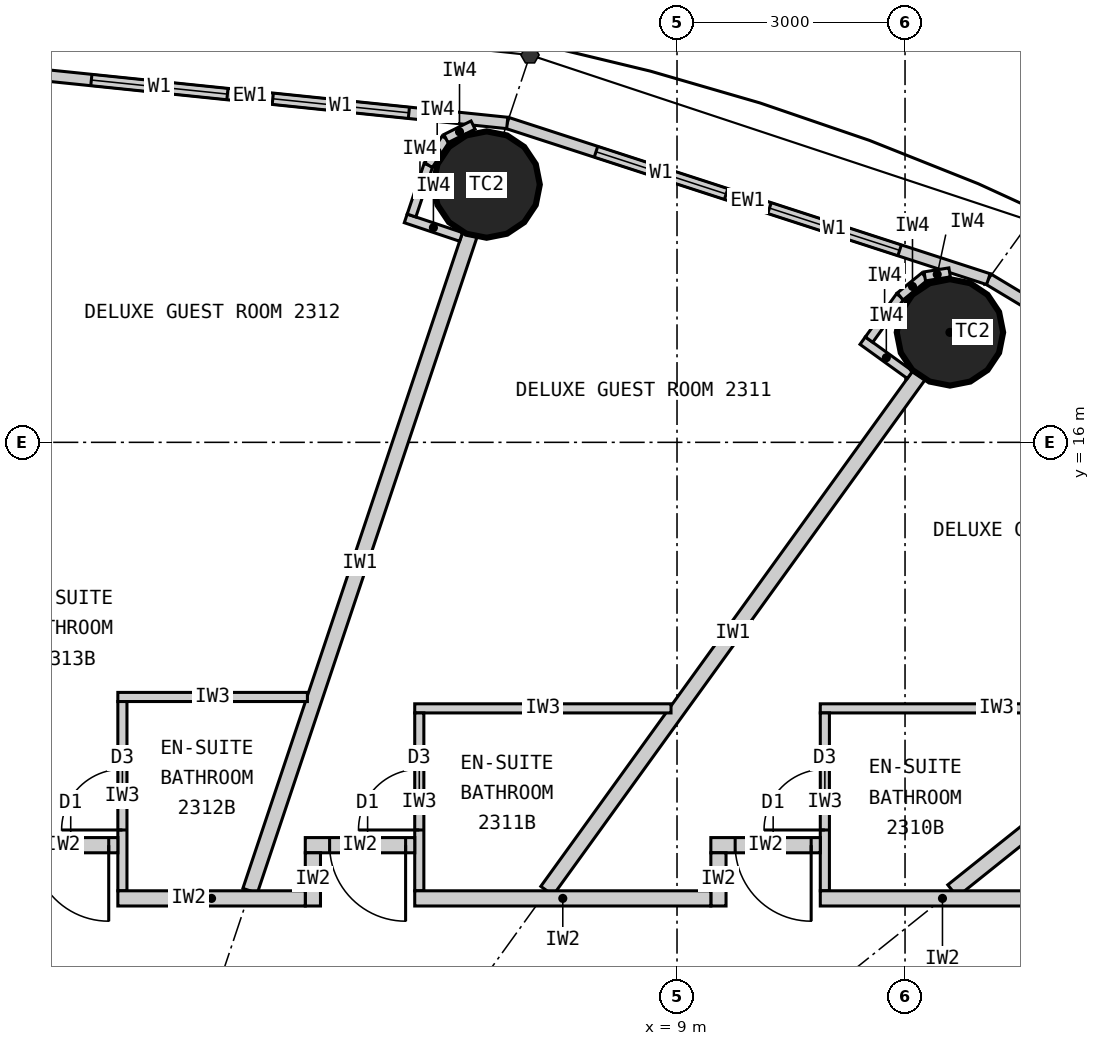
"""IFC4 building model, lengths in metres.
Left out: names, types, materials, properties, quantities, classifications, styles, units other than length and angle.
Written with IfcOpenShell. Run it as: python <this file> out.ifc"""

import sys

from ifc_helpers import new_model, si_unit, direction, frame, frame_2d, origin, origin_2d, place, context, subcontext, project, spatial, rectangle, circle, extrude, clip, halfspace, element, fill, save


model = new_model("IFC4")
c1 = context("Model", 3, precision=1e-05, world=origin(), true_north=direction((0.0, 1.0)))
c2 = subcontext(c1, "Body", "Model", "MODEL_VIEW")
j1 = project(units=[si_unit("LENGTHUNIT", "METRE"), si_unit("PLANEANGLEUNIT", "RADIAN")], contexts=[c1])
p1 = place(None, origin())
s1 = spatial("IfcSite", under=j1, at=p1, CompositionType="ELEMENT")
p2 = place(p1, origin())
s2 = spatial("IfcBuilding", under=s1, at=p2, CompositionType="ELEMENT")
p3 = place(p2, frame((0.0, 0.0, 90.3)))
s3 = spatial("IfcBuildingStorey", under=s2, at=p3, CompositionType="ELEMENT", Elevation=90.3)
for number, where, z_axis, x_axis in (
    (1, (12.591, 17.447, 0.0), (0.0, 0.0, 1.0), (1.0, 0.0, 0.0)),
    (2, (6.495, 19.391, 0.0), (0.0, 0.0, 1.0), (1.0, 0.0, 0.0)),
):
    element("IfcColumn", number, at=place(p3, frame(where, z_axis=z_axis, x_axis=x_axis)), inside=s3, PredefinedType="COLUMN", context=c2, shape_type="Clipping", body=[
        clip(extrude(circle(Radius=0.7, at=origin_2d()), origin(), (0.0, 0.0, 1.0), 3.3), halfspace(frame((0.0, 0.0, 2.25), z_axis=(0.0, 0.0, 1.0), x_axis=(1.0, 0.0, 0.0)), False)),
    ])
p4 = place(p3, frame((18.57, 14.856, 0.0), z_axis=(0.0, 0.0, 1.0), x_axis=(-0.856983180864, 0.515344377787, 0.0)))
e3 = element("IfcWall", 3, at=p4, inside=s3, PredefinedType="ELEMENTEDWALL", context=c2, shape_type="SweptSolid", body=[
    extrude(rectangle(XDim=6.386, YDim=0.15, at=frame_2d((3.193, 0.0))), origin(), (0.0, 0.0, 1.0), 3.05),
])
p5 = place(p4, frame((1.093, 0.0, 0.9)))
e4 = element("IfcOpeningElement", 4, at=p5, cuts=e3, PredefinedType="OPENING", context=c2, shape_type="SweptSolid", body=[
    extrude(rectangle(XDim=1.8, YDim=1.9, at=frame_2d((0.9, 0.95))), frame((0.0, 0.085, 0.0), z_axis=(0.0, -1.0, 0.0), x_axis=(1.0, 0.0, 0.0)), (0.0, 0.0, 1.0), 0.17),
])
p6 = place(p4, frame((3.493, 0.0, 0.9)))
e5 = element("IfcOpeningElement", 5, at=p6, cuts=e3, PredefinedType="OPENING", context=c2, shape_type="SweptSolid", body=[
    extrude(rectangle(XDim=1.8, YDim=1.9, at=frame_2d((0.9, 0.95))), frame((0.0, 0.085, 0.0), z_axis=(0.0, -1.0, 0.0), x_axis=(1.0, 0.0, 0.0)), (0.0, 0.0, 1.0), 0.17),
])
p7 = place(p3, frame((13.096, 18.147, 0.0), z_axis=(0.0, 0.0, 1.0), x_axis=(-0.951137534625, 0.308767534285, 0.0)))
e6 = element("IfcWall", 6, at=p7, inside=s3, PredefinedType="ELEMENTEDWALL", context=c2, shape_type="SweptSolid", body=[
    extrude(rectangle(XDim=6.655, YDim=0.15, at=frame_2d((3.328, 0.0))), origin(), (0.0, 0.0, 1.0), 3.05),
])
p8 = place(p7, frame((1.228, 0.0, 0.9)))
e7 = element("IfcOpeningElement", 7, at=p8, cuts=e6, PredefinedType="OPENING", context=c2, shape_type="SweptSolid", body=[
    extrude(rectangle(XDim=1.8, YDim=1.9, at=frame_2d((0.9, 0.95))), frame((0.0, 0.085, 0.0), z_axis=(0.0, -1.0, 0.0), x_axis=(1.0, 0.0, 0.0)), (0.0, 0.0, 1.0), 0.17),
])
p9 = place(p7, frame((3.628, 0.0, 0.9)))
e8 = element("IfcOpeningElement", 8, at=p9, cuts=e6, PredefinedType="OPENING", context=c2, shape_type="SweptSolid", body=[
    extrude(rectangle(XDim=1.8, YDim=1.9, at=frame_2d((0.9, 0.95))), frame((0.0, 0.085, 0.0), z_axis=(0.0, -1.0, 0.0), x_axis=(1.0, 0.0, 0.0)), (0.0, 0.0, 1.0), 0.17),
])
p10 = place(p3, frame((6.766, 20.202, 0.0), z_axis=(0.0, 0.0, 1.0), x_axis=(-0.994721394369, 0.102612609291, 0.0)))
e9 = element("IfcWall", 9, at=p10, inside=s3, PredefinedType="ELEMENTEDWALL", context=c2, shape_type="SweptSolid", body=[
    extrude(rectangle(XDim=6.802, YDim=0.15, at=frame_2d((3.401, 0.0))), origin(), (0.0, 0.0, 1.0), 3.05),
])
p11 = place(p10, frame((1.301, 0.0, 0.9)))
e10 = element("IfcOpeningElement", 10, at=p11, cuts=e9, PredefinedType="OPENING", context=c2, shape_type="SweptSolid", body=[
    extrude(rectangle(XDim=1.8, YDim=1.9, at=frame_2d((0.9, 0.95))), frame((0.0, 0.085, 0.0), z_axis=(0.0, -1.0, 0.0), x_axis=(1.0, 0.0, 0.0)), (0.0, 0.0, 1.0), 0.17),
])
p12 = place(p10, frame((3.701, 0.0, 0.9)))
e11 = element("IfcOpeningElement", 11, at=p12, cuts=e9, PredefinedType="OPENING", context=c2, shape_type="SweptSolid", body=[
    extrude(rectangle(XDim=1.8, YDim=1.9, at=frame_2d((0.9, 0.95))), frame((0.0, 0.085, 0.0), z_axis=(0.0, -1.0, 0.0), x_axis=(1.0, 0.0, 0.0)), (0.0, 0.0, 1.0), 0.17),
])
p13 = place(p3, frame((12.625, 10.1, 0.0), z_axis=(0.0, 0.0, 1.0), x_axis=(0.780892451574, 0.624665493744, 0.0)))
e12 = element("IfcWall", 12, at=p13, inside=s3, PredefinedType="PARTITIONING", context=c2, shape_type="SweptSolid", body=[
    extrude(rectangle(XDim=6.045, YDim=0.2, at=frame_2d((3.022, 0.0))), origin(), (0.0, 0.0, 1.0), 2.25),
])
p14 = place(p3, frame((7.289, 10.1, 0.0), z_axis=(0.0, 0.0, 1.0), x_axis=(0.585198353053, 0.810890182197, 0.0)))
e13 = element("IfcWall", 13, at=p14, inside=s3, PredefinedType="PARTITIONING", context=c2, shape_type="SweptSolid", body=[
    extrude(rectangle(XDim=8.36, YDim=0.2, at=frame_2d((4.18, 0.0))), origin(), (0.0, 0.0, 1.0), 2.15),
])
p15 = place(p3, frame((3.383, 10.1, 0.0), z_axis=(0.0, 0.0, 1.0), x_axis=(0.31759592231, 0.948226149256, 0.0)))
e14 = element("IfcWall", 14, at=p15, inside=s3, PredefinedType="PARTITIONING", context=c2, shape_type="SweptSolid", body=[
    extrude(rectangle(XDim=9.098, YDim=0.2, at=frame_2d((4.549, 0.0))), origin(), (0.0, 0.0, 1.0), 2.15),
])
p16 = place(p3, frame((15.525, 12.5, 0.0), z_axis=(0.0, 0.0, 1.0), x_axis=(-1.0, 0.0, 0.0)))
e15 = element("IfcWall", 15, at=p16, inside=s3, PredefinedType="PARTITIONING", context=c2, shape_type="SweptSolid", body=[
    extrude(rectangle(XDim=4.64, YDim=0.12, at=frame_2d((2.32, 0.0))), origin(), (0.0, 0.0, 1.0), 3.05),
])
p17 = place(p3, frame((10.945, 10.1, 0.0), z_axis=(0.0, 0.0, 1.0), x_axis=(0.0, 1.0, 0.0)))
e16 = element("IfcWall", 16, at=p17, inside=s3, PredefinedType="PARTITIONING", context=c2, shape_type="SweptSolid", body=[
    extrude(rectangle(XDim=2.34, YDim=0.12, at=frame_2d((1.17, 0.0))), origin(), (0.0, 0.0, 1.0), 3.05),
])
p18 = place(p17, frame((0.8, 0.0, 0.0)))
e17 = element("IfcOpeningElement", 17, at=p18, cuts=e16, PredefinedType="OPENING", context=c2, shape_type="SweptSolid", body=[
    extrude(rectangle(XDim=0.8, YDim=2.1, at=frame_2d((0.4, 1.05))), frame((0.0, 0.07, 0.0), z_axis=(0.0, -1.0, 0.0), x_axis=(1.0, 0.0, 0.0)), (0.0, 0.0, 1.0), 0.14),
])
p19 = place(p3, frame((8.921, 12.5, 0.0), z_axis=(0.0, 0.0, 1.0), x_axis=(-1.0, 0.0, 0.0)))
e18 = element("IfcWall", 18, at=p19, inside=s3, PredefinedType="PARTITIONING", context=c2, shape_type="SweptSolid", body=[
    extrude(rectangle(XDim=3.372, YDim=0.12, at=frame_2d((1.686, 0.0))), origin(), (0.0, 0.0, 1.0), 3.05),
])
p20 = place(p3, frame((5.609, 10.1, 0.0), z_axis=(0.0, 0.0, 1.0), x_axis=(0.0, 1.0, 0.0)))
e19 = element("IfcWall", 19, at=p20, inside=s3, PredefinedType="PARTITIONING", context=c2, shape_type="SweptSolid", body=[
    extrude(rectangle(XDim=2.34, YDim=0.12, at=frame_2d((1.17, 0.0))), origin(), (0.0, 0.0, 1.0), 3.05),
])
p21 = place(p20, frame((0.8, 0.0, 0.0)))
e20 = element("IfcOpeningElement", 20, at=p21, cuts=e19, PredefinedType="OPENING", context=c2, shape_type="SweptSolid", body=[
    extrude(rectangle(XDim=0.8, YDim=2.1, at=frame_2d((0.4, 1.05))), frame((0.0, 0.07, 0.0), z_axis=(0.0, -1.0, 0.0), x_axis=(1.0, 0.0, 0.0)), (0.0, 0.0, 1.0), 0.14),
])
p22 = place(p3, frame((4.137, 12.65, 0.0), z_axis=(0.0, 0.0, 1.0), x_axis=(-1.0, 0.0, 0.0)))
e21 = element("IfcWall", 21, at=p22, inside=s3, PredefinedType="PARTITIONING", context=c2, shape_type="SweptSolid", body=[
    extrude(rectangle(XDim=2.494, YDim=0.12, at=frame_2d((1.247, 0.0))), origin(), (0.0, 0.0, 1.0), 3.05),
])
p23 = place(p3, frame((1.703, 10.1, 0.0), z_axis=(0.0, 0.0, 1.0), x_axis=(0.0, 1.0, 0.0)))
e22 = element("IfcWall", 22, at=p23, inside=s3, PredefinedType="PARTITIONING", context=c2, shape_type="SweptSolid", body=[
    extrude(rectangle(XDim=2.49, YDim=0.12, at=frame_2d((1.245, 0.0))), origin(), (0.0, 0.0, 1.0), 3.05),
])
p24 = place(p23, frame((0.8, 0.0, 0.0)))
e23 = element("IfcOpeningElement", 23, at=p24, cuts=e22, PredefinedType="OPENING", context=c2, shape_type="SweptSolid", body=[
    extrude(rectangle(XDim=0.8, YDim=2.1, at=frame_2d((0.4, 1.05))), frame((0.0, 0.07, 0.0), z_axis=(0.0, -1.0, 0.0), x_axis=(1.0, 0.0, 0.0)), (0.0, 0.0, 1.0), 0.14),
])
p25 = place(p3, frame((9.445, 10.7, 0.0), z_axis=(0.0, 0.0, 1.0), x_axis=(1.0, 0.0, 0.0)))
e24 = element("IfcWall", 24, at=p25, inside=s3, PredefinedType="PARTITIONING", context=c2, shape_type="SweptSolid", body=[
    extrude(rectangle(XDim=1.44, YDim=0.2, at=frame_2d((0.72, 0.0))), origin(), (0.0, 0.0, 1.0), 3.05),
])
p26 = place(p25, frame((0.32, 0.0, 0.0)))
e25 = element("IfcOpeningElement", 25, at=p26, cuts=e24, PredefinedType="OPENING", context=c2, shape_type="SweptSolid", body=[
    extrude(rectangle(XDim=1.0, YDim=2.2, at=frame_2d((0.5, 1.1))), frame((0.0, 0.11, 0.0), z_axis=(0.0, -1.0, 0.0), x_axis=(1.0, 0.0, 0.0)), (0.0, 0.0, 1.0), 0.22),
])
p27 = place(p3, frame((9.545, 9.9, 0.0), z_axis=(0.0, 0.0, 1.0), x_axis=(0.0, 1.0, 0.0)))
e26 = element("IfcWall", 26, at=p27, inside=s3, PredefinedType="PARTITIONING", context=c2, shape_type="SweptSolid", body=[
    extrude(rectangle(XDim=0.7, YDim=0.2, at=frame_2d((0.35, 0.0))), origin(), (0.0, 0.0, 1.0), 3.05),
])
p28 = place(p3, frame((4.109, 10.7, 0.0), z_axis=(0.0, 0.0, 1.0), x_axis=(1.0, 0.0, 0.0)))
e27 = element("IfcWall", 27, at=p28, inside=s3, PredefinedType="PARTITIONING", context=c2, shape_type="SweptSolid", body=[
    extrude(rectangle(XDim=1.44, YDim=0.2, at=frame_2d((0.72, 0.0))), origin(), (0.0, 0.0, 1.0), 3.05),
])
p29 = place(p28, frame((0.32, 0.0, 0.0)))
e28 = element("IfcOpeningElement", 28, at=p29, cuts=e27, PredefinedType="OPENING", context=c2, shape_type="SweptSolid", body=[
    extrude(rectangle(XDim=1.0, YDim=2.2, at=frame_2d((0.5, 1.1))), frame((0.0, 0.11, 0.0), z_axis=(0.0, -1.0, 0.0), x_axis=(1.0, 0.0, 0.0)), (0.0, 0.0, 1.0), 0.22),
])
p30 = place(p3, frame((4.209, 9.9, 0.0), z_axis=(0.0, 0.0, 1.0), x_axis=(0.0, 1.0, 0.0)))
e29 = element("IfcWall", 29, at=p30, inside=s3, PredefinedType="PARTITIONING", context=c2, shape_type="SweptSolid", body=[
    extrude(rectangle(XDim=0.7, YDim=0.2, at=frame_2d((0.35, 0.0))), origin(), (0.0, 0.0, 1.0), 3.05),
])
p31 = place(p3, frame((0.203, 10.7, 0.0), z_axis=(0.0, 0.0, 1.0), x_axis=(1.0, 0.0, 0.0)))
e30 = element("IfcWall", 30, at=p31, inside=s3, PredefinedType="PARTITIONING", context=c2, shape_type="SweptSolid", body=[
    extrude(rectangle(XDim=1.44, YDim=0.2, at=frame_2d((0.72, 0.0))), origin(), (0.0, 0.0, 1.0), 3.05),
])
p32 = place(p31, frame((0.32, 0.0, 0.0)))
e31 = element("IfcOpeningElement", 31, at=p32, cuts=e30, PredefinedType="OPENING", context=c2, shape_type="SweptSolid", body=[
    extrude(rectangle(XDim=1.0, YDim=2.2, at=frame_2d((0.5, 1.1))), frame((0.0, 0.11, 0.0), z_axis=(0.0, -1.0, 0.0), x_axis=(1.0, 0.0, 0.0)), (0.0, 0.0, 1.0), 0.22),
])
p33 = place(p3, frame((1.643, 10.0, 0.0), z_axis=(0.0, 0.0, 1.0), x_axis=(1.0, 0.0, 0.0)))
e32 = element("IfcWall", 32, at=p33, inside=s3, PredefinedType="PARTITIONING", context=c2, shape_type="SweptSolid", body=[
    extrude(rectangle(XDim=2.466, YDim=0.2, at=frame_2d((1.233, 0.0))), origin(), (0.0, 0.0, 1.0), 3.05),
])
p34 = place(p3, frame((5.549, 10.0, 0.0), z_axis=(0.0, 0.0, 1.0), x_axis=(1.0, 0.0, 0.0)))
e33 = element("IfcWall", 33, at=p34, inside=s3, PredefinedType="PARTITIONING", context=c2, shape_type="SweptSolid", body=[
    extrude(rectangle(XDim=3.896, YDim=0.2, at=frame_2d((1.948, 0.0))), origin(), (0.0, 0.0, 1.0), 3.05),
])
p35 = place(p3, frame((10.885, 10.0, 0.0), z_axis=(0.0, 0.0, 1.0), x_axis=(1.0, 0.0, 0.0)))
e34 = element("IfcWall", 34, at=p35, inside=s3, PredefinedType="PARTITIONING", context=c2, shape_type="SweptSolid", body=[
    extrude(rectangle(XDim=3.215, YDim=0.2, at=frame_2d((1.607, 0.0))), origin(), (0.0, 0.0, 1.0), 3.05),
])
p36 = place(p3, frame((12.065, 16.889, 0.0), z_axis=(0.0, 0.0, 1.0), x_axis=(-0.810821798253, 0.585293098778, 0.0)))
e35 = element("IfcWall", 35, at=p36, inside=s3, PredefinedType="PARTITIONING", context=c2, shape_type="SweptSolid", body=[
    extrude(rectangle(XDim=0.768, YDim=0.12, at=frame_2d((0.384, 0.0))), origin(), (0.0, 0.0, 1.0), 3.05),
])
p37 = place(p3, frame((11.526, 17.351, 0.0), z_axis=(0.0, 0.0, 1.0), x_axis=(0.585223113993, 0.810872312296, 0.0)))
e36 = element("IfcWall", 36, at=p37, inside=s3, PredefinedType="PARTITIONING", context=c2, shape_type="SweptSolid", body=[
    extrude(rectangle(XDim=0.7, YDim=0.12, at=frame_2d((0.35, 0.0))), origin(), (0.0, 0.0, 1.0), 3.05),
])
p38 = place(p3, frame((11.936, 17.919, 0.0), z_axis=(0.0, 0.0, 1.0), x_axis=(0.775023088441, 0.631932917629, 0.0)))
e37 = element("IfcWall", 37, at=p38, inside=s3, PredefinedType="PARTITIONING", context=c2, shape_type="SweptSolid", body=[
    extrude(rectangle(XDim=0.418, YDim=0.12, at=frame_2d((0.209, 0.0))), origin(), (0.0, 0.0, 1.0), 3.05),
])
p39 = place(p3, frame((12.26, 18.183, 0.0), z_axis=(0.0, 0.0, 1.0), x_axis=(0.987218661664, 0.159371622511, 0.0)))
e38 = element("IfcWall", 38, at=p39, inside=s3, PredefinedType="PARTITIONING", context=c2, shape_type="SweptSolid", body=[
    extrude(rectangle(XDim=0.331, YDim=0.12, at=frame_2d((0.166, 0.0))), origin(), (0.0, 0.0, 1.0), 3.05),
])
p40 = place(p3, frame((6.159, 18.702, 0.0), z_axis=(0.0, 0.0, 1.0), x_axis=(-0.948173154049, 0.31775410295, 0.0)))
e39 = element("IfcWall", 39, at=p40, inside=s3, PredefinedType="PARTITIONING", context=c2, shape_type="SweptSolid", body=[
    extrude(rectangle(XDim=0.768, YDim=0.12, at=frame_2d((0.384, 0.0))), origin(), (0.0, 0.0, 1.0), 3.05),
])
p41 = place(p3, frame((5.507, 18.984, 0.0), z_axis=(0.0, 0.0, 1.0), x_axis=(0.317692050622, 0.948193946918, 0.0)))
e40 = element("IfcWall", 40, at=p41, inside=s3, PredefinedType="PARTITIONING", context=c2, shape_type="SweptSolid", body=[
    extrude(rectangle(XDim=0.7, YDim=0.12, at=frame_2d((0.35, 0.0))), origin(), (0.0, 0.0, 1.0), 3.05),
])
p42 = place(p3, frame((5.729, 19.648, 0.0), z_axis=(0.0, 0.0, 1.0), x_axis=(0.552135764955, 0.833754218615, 0.0)))
e41 = element("IfcWall", 41, at=p42, inside=s3, PredefinedType="PARTITIONING", context=c2, shape_type="SweptSolid", body=[
    extrude(rectangle(XDim=0.418, YDim=0.12, at=frame_2d((0.209, 0.0))), origin(), (0.0, 0.0, 1.0), 3.05),
])
p43 = place(p3, frame((5.96, 19.996, 0.0), z_axis=(0.0, 0.0, 1.0), x_axis=(0.895160725913, 0.445743507842, 0.0)))
e42 = element("IfcWall", 42, at=p43, inside=s3, PredefinedType="PARTITIONING", context=c2, shape_type="SweptSolid", body=[
    extrude(rectangle(XDim=0.399, YDim=0.12, at=frame_2d((0.199, 0.0))), origin(), (0.0, 0.0, 1.0), 3.05),
])
p44 = place(p8, origin())
e43 = element("IfcWindow", 43, at=p44, inside=s3, PartitioningType="SINGLE_PANEL", PredefinedType="WINDOW", context=c2, shape_type="SweptSolid", body=[
    extrude(rectangle(XDim=1.8, YDim=1.9, at=frame_2d((0.9, 0.95))), frame((0.0, 0.03, 0.0), z_axis=(0.0, -1.0, 0.0), x_axis=(1.0, 0.0, 0.0)), (0.0, 0.0, 1.0), 0.06),
])
fill(e7, e43)
p45 = place(p9, origin())
e44 = element("IfcWindow", 44, at=p45, inside=s3, PartitioningType="SINGLE_PANEL", PredefinedType="WINDOW", context=c2, shape_type="SweptSolid", body=[
    extrude(rectangle(XDim=1.8, YDim=1.9, at=frame_2d((0.9, 0.95))), frame((0.0, 0.03, 0.0), z_axis=(0.0, -1.0, 0.0), x_axis=(1.0, 0.0, 0.0)), (0.0, 0.0, 1.0), 0.06),
])
fill(e8, e44)
p46 = place(p11, origin())
e45 = element("IfcWindow", 45, at=p46, inside=s3, PartitioningType="SINGLE_PANEL", PredefinedType="WINDOW", context=c2, shape_type="SweptSolid", body=[
    extrude(rectangle(XDim=1.8, YDim=1.9, at=frame_2d((0.9, 0.95))), frame((0.0, 0.03, 0.0), z_axis=(0.0, -1.0, 0.0), x_axis=(1.0, 0.0, 0.0)), (0.0, 0.0, 1.0), 0.06),
])
fill(e10, e45)
p47 = place(p12, origin())
e46 = element("IfcWindow", 46, at=p47, inside=s3, PartitioningType="SINGLE_PANEL", PredefinedType="WINDOW", context=c2, shape_type="SweptSolid", body=[
    extrude(rectangle(XDim=1.8, YDim=1.9, at=frame_2d((0.9, 0.95))), frame((0.0, 0.03, 0.0), z_axis=(0.0, -1.0, 0.0), x_axis=(1.0, 0.0, 0.0)), (0.0, 0.0, 1.0), 0.06),
])
fill(e11, e46)
p48 = place(p18, origin())
e47 = element("IfcDoor", 47, at=p48, inside=s3, OperationType="SINGLE_SWING_LEFT", PredefinedType="DOOR", context=c2, shape_type="SweptSolid", body=[
    extrude(rectangle(XDim=0.8, YDim=2.1, at=frame_2d((0.4, 1.05))), frame((0.0, 0.025, 0.0), z_axis=(0.0, -1.0, 0.0), x_axis=(1.0, 0.0, 0.0)), (0.0, 0.0, 1.0), 0.05),
])
fill(e17, e47)
p49 = place(p26, origin())
e48 = element("IfcDoor", 48, at=p49, inside=s3, OperationType="SINGLE_SWING_RIGHT", PredefinedType="DOOR", context=c2, shape_type="SweptSolid", body=[
    extrude(rectangle(XDim=1.0, YDim=2.2, at=frame_2d((0.5, 1.1))), frame((0.0, 0.025, 0.0), z_axis=(0.0, -1.0, 0.0), x_axis=(1.0, 0.0, 0.0)), (0.0, 0.0, 1.0), 0.05),
])
fill(e25, e48)
p50 = place(p21, origin())
e49 = element("IfcDoor", 49, at=p50, inside=s3, OperationType="SINGLE_SWING_LEFT", PredefinedType="DOOR", context=c2, shape_type="SweptSolid", body=[
    extrude(rectangle(XDim=0.8, YDim=2.1, at=frame_2d((0.4, 1.05))), frame((0.0, 0.025, 0.0), z_axis=(0.0, -1.0, 0.0), x_axis=(1.0, 0.0, 0.0)), (0.0, 0.0, 1.0), 0.05),
])
fill(e20, e49)
p51 = place(p29, origin())
e50 = element("IfcDoor", 50, at=p51, inside=s3, OperationType="SINGLE_SWING_RIGHT", PredefinedType="DOOR", context=c2, shape_type="SweptSolid", body=[
    extrude(rectangle(XDim=1.0, YDim=2.2, at=frame_2d((0.5, 1.1))), frame((0.0, 0.025, 0.0), z_axis=(0.0, -1.0, 0.0), x_axis=(1.0, 0.0, 0.0)), (0.0, 0.0, 1.0), 0.05),
])
fill(e28, e50)
p52 = place(p24, origin())
e51 = element("IfcDoor", 51, at=p52, inside=s3, OperationType="SINGLE_SWING_LEFT", PredefinedType="DOOR", context=c2, shape_type="SweptSolid", body=[
    extrude(rectangle(XDim=0.8, YDim=2.1, at=frame_2d((0.4, 1.05))), frame((0.0, 0.025, 0.0), z_axis=(0.0, -1.0, 0.0), x_axis=(1.0, 0.0, 0.0)), (0.0, 0.0, 1.0), 0.05),
])
fill(e23, e51)
p53 = place(p32, origin())
e52 = element("IfcDoor", 52, at=p53, inside=s3, OperationType="SINGLE_SWING_RIGHT", PredefinedType="DOOR", context=c2, shape_type="SweptSolid", body=[
    extrude(rectangle(XDim=1.0, YDim=2.2, at=frame_2d((0.5, 1.1))), frame((0.0, 0.025, 0.0), z_axis=(0.0, -1.0, 0.0), x_axis=(1.0, 0.0, 0.0)), (0.0, 0.0, 1.0), 0.05),
])
fill(e31, e52)
save(model, sys.argv[1])
